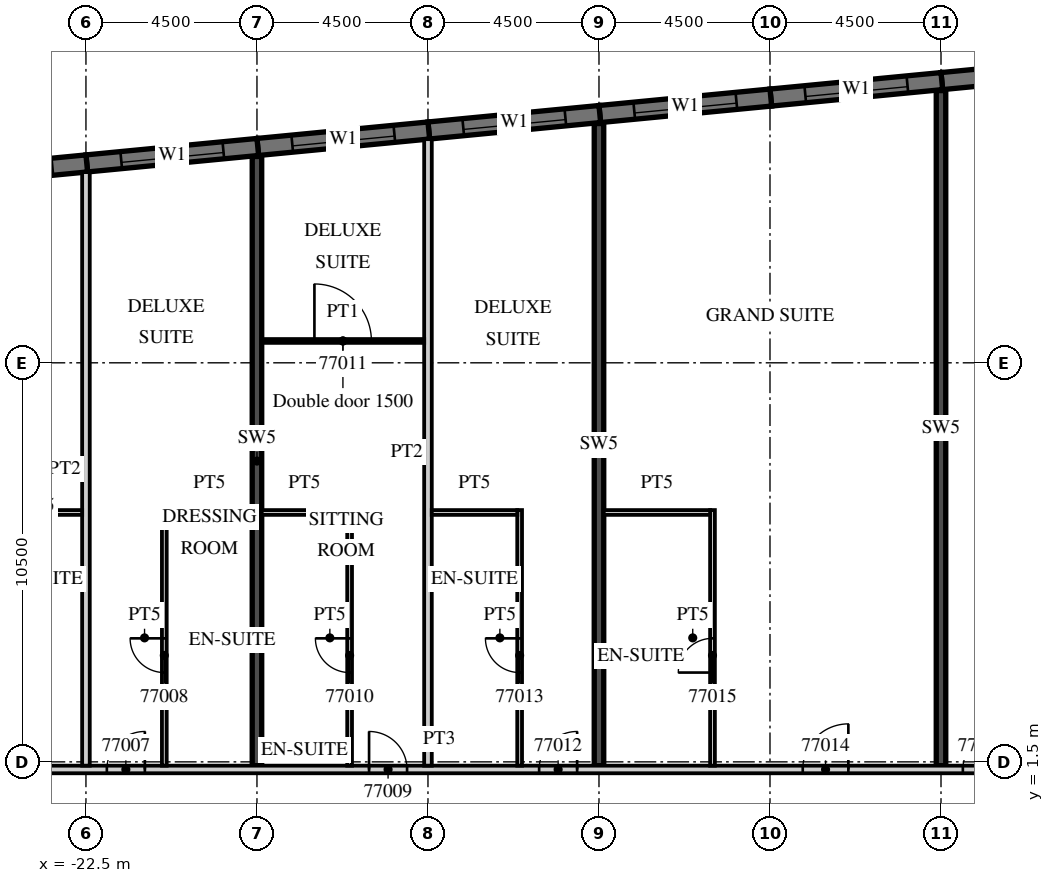
"""IFC4 building model, lengths in metres.
Left out: names, types, materials, properties, quantities, classifications, styles, units other than length and angle.
Written with IfcOpenShell. Run it as: python <this file> out.ifc"""

import sys

from ifc_helpers import new_model, si_unit, direction, frame, frame_2d, origin, place, context, subcontext, project, spatial, rectangle, extrude, element, fill, save


model = new_model("IFC4")
c1 = context("Model", 3, precision=1e-05, world=origin(), true_north=direction((0.0, 1.0)))
c2 = subcontext(c1, "Body", "Model", "MODEL_VIEW")
j1 = project(units=[si_unit("LENGTHUNIT", "METRE"), si_unit("PLANEANGLEUNIT", "RADIAN")], contexts=[c1])
p1 = place(None, origin())
s1 = spatial("IfcSite", under=j1, at=p1, CompositionType="ELEMENT")
p2 = place(p1, origin())
s2 = spatial("IfcBuilding", under=s1, at=p2, CompositionType="ELEMENT")
p3 = place(p2, frame((0.0, 0.0, 304.8)))
s3 = spatial("IfcBuildingStorey", under=s2, at=p3, CompositionType="ELEMENT", Elevation=304.8)
p4 = place(p3, frame((-18.0, 1.4, 0.0), z_axis=(0.0, 0.0, 1.0), x_axis=(0.0, 1.0, 0.0)))
e1 = element("IfcWall", 1, at=p4, inside=s3, PredefinedType="SHEAR", context=c2, shape_type="SweptSolid", body=[
    extrude(rectangle(XDim=16.03, YDim=0.25, at=frame_2d((8.015, 0.0))), origin(), (0.0, 0.0, 1.0), 3.3),
])
p5 = place(p3, frame((-9.0, 1.4, 0.0), z_axis=(0.0, 0.0, 1.0), x_axis=(0.0, 1.0, 0.0)))
e2 = element("IfcWall", 2, at=p5, inside=s3, PredefinedType="SHEAR", context=c2, shape_type="SweptSolid", body=[
    extrude(rectangle(XDim=16.896, YDim=0.25, at=frame_2d((8.448, 0.0))), origin(), (0.0, 0.0, 1.0), 3.3),
])
p6 = place(p3, frame((0.0, 1.4, 0.0), z_axis=(0.0, 0.0, 1.0), x_axis=(0.0, 1.0, 0.0)))
e3 = element("IfcWall", 3, at=p6, inside=s3, PredefinedType="SHEAR", context=c2, shape_type="SweptSolid", body=[
    extrude(rectangle(XDim=17.763, YDim=0.25, at=frame_2d((8.881, 0.0))), origin(), (0.0, 0.0, 1.0), 3.3),
])
p7 = place(p3, frame((4.521, 19.846, 0.0), z_axis=(0.0, 0.0, 1.0), x_axis=(-0.995394670263, -0.095861621166, 0.0)))
e4 = element("IfcWall", 4, at=p7, inside=s3, PredefinedType="SOLIDWALL", context=c2, shape_type="SweptSolid", body=[
    extrude(rectangle(XDim=4.521, YDim=0.45, at=frame_2d((2.26, 0.0))), origin(), (0.0, 0.0, 1.0), 2.9),
])
p8 = place(p7, frame((0.91, 0.0, 0.45)))
e5 = element("IfcOpeningElement", 5, at=p8, cuts=e4, PredefinedType="OPENING", context=c2, shape_type="SweptSolid", body=[
    extrude(rectangle(XDim=2.7, YDim=2.25, at=frame_2d((1.35, 1.125))), frame((0.0, 0.235, 0.0), z_axis=(0.0, -1.0, 0.0), x_axis=(1.0, 0.0, 0.0)), (0.0, 0.0, 1.0), 0.47),
])
p9 = place(p3, frame((0.022, 19.413, 0.0), z_axis=(0.0, 0.0, 1.0), x_axis=(-0.995400317863, -0.09580296028, 0.0)))
e6 = element("IfcWall", 6, at=p9, inside=s3, PredefinedType="SOLIDWALL", context=c2, shape_type="SweptSolid", body=[
    extrude(rectangle(XDim=4.521, YDim=0.45, at=frame_2d((2.26, 0.0))), origin(), (0.0, 0.0, 1.0), 2.9),
])
p10 = place(p9, frame((0.91, 0.0, 0.45)))
e7 = element("IfcOpeningElement", 7, at=p10, cuts=e6, PredefinedType="OPENING", context=c2, shape_type="SweptSolid", body=[
    extrude(rectangle(XDim=2.7, YDim=2.25, at=frame_2d((1.35, 1.125))), frame((0.0, 0.235, 0.0), z_axis=(0.0, -1.0, 0.0), x_axis=(1.0, 0.0, 0.0)), (0.0, 0.0, 1.0), 0.47),
])
p11 = place(p3, frame((-4.478, 18.98, 0.0), z_axis=(0.0, 0.0, 1.0), x_axis=(-0.995395662684, -0.095851315644, 0.0)))
e8 = element("IfcWall", 8, at=p11, inside=s3, PredefinedType="SOLIDWALL", context=c2, shape_type="SweptSolid", body=[
    extrude(rectangle(XDim=4.521, YDim=0.45, at=frame_2d((2.26, 0.0))), origin(), (0.0, 0.0, 1.0), 2.9),
])
p12 = place(p11, frame((0.91, 0.0, 0.45)))
e9 = element("IfcOpeningElement", 9, at=p12, cuts=e8, PredefinedType="OPENING", context=c2, shape_type="SweptSolid", body=[
    extrude(rectangle(XDim=2.7, YDim=2.25, at=frame_2d((1.35, 1.125))), frame((0.0, 0.235, 0.0), z_axis=(0.0, -1.0, 0.0), x_axis=(1.0, 0.0, 0.0)), (0.0, 0.0, 1.0), 0.47),
])
p13 = place(p3, frame((-8.979, 18.546, 0.0), z_axis=(0.0, 0.0, 1.0), x_axis=(-0.995395166513, -0.095856468129, 0.0)))
e10 = element("IfcWall", 10, at=p13, inside=s3, PredefinedType="SOLIDWALL", context=c2, shape_type="SweptSolid", body=[
    extrude(rectangle(XDim=4.521, YDim=0.45, at=frame_2d((2.26, 0.0))), origin(), (0.0, 0.0, 1.0), 2.9),
])
p14 = place(p13, frame((0.91, 0.0, 0.45)))
e11 = element("IfcOpeningElement", 11, at=p14, cuts=e10, PredefinedType="OPENING", context=c2, shape_type="SweptSolid", body=[
    extrude(rectangle(XDim=2.7, YDim=2.25, at=frame_2d((1.35, 1.125))), frame((0.0, 0.235, 0.0), z_axis=(0.0, -1.0, 0.0), x_axis=(1.0, 0.0, 0.0)), (0.0, 0.0, 1.0), 0.47),
])
p15 = place(p3, frame((-13.479, 18.113, 0.0), z_axis=(0.0, 0.0, 1.0), x_axis=(-0.995395166513, -0.095856468129, 0.0)))
e12 = element("IfcWall", 12, at=p15, inside=s3, PredefinedType="SOLIDWALL", context=c2, shape_type="SweptSolid", body=[
    extrude(rectangle(XDim=4.521, YDim=0.45, at=frame_2d((2.26, 0.0))), origin(), (0.0, 0.0, 1.0), 2.9),
])
p16 = place(p15, frame((0.91, 0.0, 0.45)))
e13 = element("IfcOpeningElement", 13, at=p16, cuts=e12, PredefinedType="OPENING", context=c2, shape_type="SweptSolid", body=[
    extrude(rectangle(XDim=2.7, YDim=2.25, at=frame_2d((1.35, 1.125))), frame((0.0, 0.235, 0.0), z_axis=(0.0, -1.0, 0.0), x_axis=(1.0, 0.0, 0.0)), (0.0, 0.0, 1.0), 0.47),
])
p17 = place(p3, frame((-17.979, 17.68, 0.0), z_axis=(0.0, 0.0, 1.0), x_axis=(-0.995395166513, -0.095856468129, 0.0)))
e14 = element("IfcWall", 14, at=p17, inside=s3, PredefinedType="SOLIDWALL", context=c2, shape_type="SweptSolid", body=[
    extrude(rectangle(XDim=4.521, YDim=0.45, at=frame_2d((2.26, 0.0))), origin(), (0.0, 0.0, 1.0), 2.9),
])
p18 = place(p17, frame((0.91, 0.0, 0.45)))
e15 = element("IfcOpeningElement", 15, at=p18, cuts=e14, PredefinedType="OPENING", context=c2, shape_type="SweptSolid", body=[
    extrude(rectangle(XDim=2.7, YDim=2.25, at=frame_2d((1.35, 1.125))), frame((0.0, 0.235, 0.0), z_axis=(0.0, -1.0, 0.0), x_axis=(1.0, 0.0, 0.0)), (0.0, 0.0, 1.0), 0.47),
])
p19 = place(p3, frame((-22.479, 17.246, 0.0), z_axis=(0.0, 0.0, 1.0), x_axis=(-0.995400317863, -0.09580296028, 0.0)))
e16 = element("IfcWall", 16, at=p19, inside=s3, PredefinedType="SOLIDWALL", context=c2, shape_type="SweptSolid", body=[
    extrude(rectangle(XDim=4.521, YDim=0.45, at=frame_2d((2.26, 0.0))), origin(), (0.0, 0.0, 1.0), 2.9),
])
p20 = place(p19, frame((0.91, 0.0, 0.45)))
e17 = element("IfcOpeningElement", 17, at=p20, cuts=e16, PredefinedType="OPENING", context=c2, shape_type="SweptSolid", body=[
    extrude(rectangle(XDim=2.7, YDim=2.25, at=frame_2d((1.35, 1.125))), frame((0.0, 0.235, 0.0), z_axis=(0.0, -1.0, 0.0), x_axis=(1.0, 0.0, 0.0)), (0.0, 0.0, 1.0), 0.47),
])
p21 = place(p3, frame((-39.909, 1.3, 0.0), z_axis=(0.0, 0.0, 1.0), x_axis=(1.0, 0.0, 0.0)))
e18 = element("IfcWall", 18, at=p21, inside=s3, PredefinedType="PARTITIONING", context=c2, shape_type="SweptSolid", body=[
    extrude(rectangle(XDim=53.409, YDim=0.2, at=frame_2d((26.705, 0.0))), origin(), (0.0, 0.0, 1.0), 2.9),
])
p22 = place(p21, frame((0.15, 0.0, 0.0)))
e19 = element("IfcOpeningElement", 19, at=p22, cuts=e18, PredefinedType="OPENING", context=c2, shape_type="SweptSolid", body=[
    extrude(rectangle(XDim=0.9, YDim=2.1, at=frame_2d((0.45, 1.05))), frame((0.0, 0.11, 0.0), z_axis=(0.0, -1.0, 0.0), x_axis=(1.0, 0.0, 0.0)), (0.0, 0.0, 1.0), 0.22),
])
p23 = place(p21, frame((9.271, 0.0, 0.0)))
e20 = element("IfcOpeningElement", 20, at=p23, cuts=e18, PredefinedType="OPENING", context=c2, shape_type="SweptSolid", body=[
    extrude(rectangle(XDim=1.2, YDim=2.1, at=frame_2d((0.6, 1.05))), frame((0.0, 0.11, 0.0), z_axis=(0.0, -1.0, 0.0), x_axis=(1.0, 0.0, 0.0)), (0.0, 0.0, 1.0), 0.22),
])
p24 = place(p21, frame((13.484, 0.0, 0.0)))
e21 = element("IfcOpeningElement", 21, at=p24, cuts=e18, PredefinedType="OPENING", context=c2, shape_type="SweptSolid", body=[
    extrude(rectangle(XDim=1.0, YDim=2.1, at=frame_2d((0.5, 1.05))), frame((0.0, 0.11, 0.0), z_axis=(0.0, -1.0, 0.0), x_axis=(1.0, 0.0, 0.0)), (0.0, 0.0, 1.0), 0.22),
])
p25 = place(p21, frame((17.959, 0.0, 0.0)))
e22 = element("IfcOpeningElement", 22, at=p25, cuts=e18, PredefinedType="OPENING", context=c2, shape_type="SweptSolid", body=[
    extrude(rectangle(XDim=1.0, YDim=2.1, at=frame_2d((0.5, 1.05))), frame((0.0, 0.11, 0.0), z_axis=(0.0, -1.0, 0.0), x_axis=(1.0, 0.0, 0.0)), (0.0, 0.0, 1.0), 0.22),
])
p26 = place(p21, frame((24.859, 0.0, 0.0)))
e23 = element("IfcOpeningElement", 23, at=p26, cuts=e18, PredefinedType="OPENING", context=c2, shape_type="SweptSolid", body=[
    extrude(rectangle(XDim=1.0, YDim=2.1, at=frame_2d((0.5, 1.05))), frame((0.0, 0.11, 0.0), z_axis=(0.0, -1.0, 0.0), x_axis=(1.0, 0.0, 0.0)), (0.0, 0.0, 1.0), 0.22),
])
p27 = place(p21, frame((29.334, 0.0, 0.0)))
e24 = element("IfcOpeningElement", 24, at=p27, cuts=e18, PredefinedType="OPENING", context=c2, shape_type="SweptSolid", body=[
    extrude(rectangle(XDim=1.0, YDim=2.1, at=frame_2d((0.5, 1.05))), frame((0.0, 0.11, 0.0), z_axis=(0.0, -1.0, 0.0), x_axis=(1.0, 0.0, 0.0)), (0.0, 0.0, 1.0), 0.22),
])
p28 = place(p21, frame((36.271, 0.0, 0.0)))
e25 = element("IfcOpeningElement", 25, at=p28, cuts=e18, PredefinedType="OPENING", context=c2, shape_type="SweptSolid", body=[
    extrude(rectangle(XDim=1.2, YDim=2.1, at=frame_2d((0.6, 1.05))), frame((0.0, 0.11, 0.0), z_axis=(0.0, -1.0, 0.0), x_axis=(1.0, 0.0, 0.0)), (0.0, 0.0, 1.0), 0.22),
])
p29 = place(p21, frame((40.484, 0.0, 0.0)))
e26 = element("IfcOpeningElement", 26, at=p29, cuts=e18, PredefinedType="OPENING", context=c2, shape_type="SweptSolid", body=[
    extrude(rectangle(XDim=1.0, YDim=2.1, at=frame_2d((0.5, 1.05))), frame((0.0, 0.11, 0.0), z_axis=(0.0, -1.0, 0.0), x_axis=(1.0, 0.0, 0.0)), (0.0, 0.0, 1.0), 0.22),
])
p30 = place(p21, frame((47.334, 0.0, 0.0)))
e27 = element("IfcOpeningElement", 27, at=p30, cuts=e18, PredefinedType="OPENING", context=c2, shape_type="SweptSolid", body=[
    extrude(rectangle(XDim=1.0, YDim=2.1, at=frame_2d((0.5, 1.05))), frame((0.0, 0.11, 0.0), z_axis=(0.0, -1.0, 0.0), x_axis=(1.0, 0.0, 0.0)), (0.0, 0.0, 1.0), 0.22),
])
p31 = place(p21, frame((51.834, 0.0, 0.0)))
e28 = element("IfcOpeningElement", 28, at=p31, cuts=e18, PredefinedType="OPENING", context=c2, shape_type="SweptSolid", body=[
    extrude(rectangle(XDim=1.0, YDim=2.1, at=frame_2d((0.5, 1.05))), frame((0.0, 0.11, 0.0), z_axis=(0.0, -1.0, 0.0), x_axis=(1.0, 0.0, 0.0)), (0.0, 0.0, 1.0), 0.22),
])
p32 = place(p3, frame((-22.5, 1.4, 0.0), z_axis=(0.0, 0.0, 1.0), x_axis=(0.0, 1.0, 0.0)))
e29 = element("IfcWall", 29, at=p32, inside=s3, PredefinedType="PARTITIONING", context=c2, shape_type="SweptSolid", body=[
    extrude(rectangle(XDim=15.618, YDim=0.2, at=frame_2d((7.809, 0.0))), origin(), (0.0, 0.0, 1.0), 2.9),
])
p33 = place(p3, frame((-24.85, 8.062, 0.0), z_axis=(0.0, 0.0, 1.0), x_axis=(1.0, 0.0, 0.0)))
e30 = element("IfcWall", 30, at=p33, inside=s3, PredefinedType="PARTITIONING", context=c2, shape_type="SweptSolid", body=[
    extrude(rectangle(XDim=2.25, YDim=0.125, at=frame_2d((1.125, 0.0))), origin(), (0.0, 0.0, 1.0), 2.9),
])
p34 = place(p3, frame((-20.438, 1.4, 0.0), z_axis=(0.0, 0.0, 1.0), x_axis=(0.0, 1.0, 0.0)))
e31 = element("IfcWall", 31, at=p34, inside=s3, PredefinedType="PARTITIONING", context=c2, shape_type="SweptSolid", body=[
    extrude(rectangle(XDim=6.725, YDim=0.125, at=frame_2d((3.363, 0.0))), origin(), (0.0, 0.0, 1.0), 2.9),
])
p35 = place(p34, frame((2.45, 0.0, 0.0)))
e32 = element("IfcOpeningElement", 32, at=p35, cuts=e31, PredefinedType="OPENING", context=c2, shape_type="SweptSolid", body=[
    extrude(rectangle(XDim=0.9, YDim=2.1, at=frame_2d((0.45, 1.05))), frame((0.0, 0.073, 0.0), z_axis=(0.0, -1.0, 0.0), x_axis=(1.0, 0.0, 0.0)), (0.0, 0.0, 1.0), 0.145),
])
p36 = place(p3, frame((-20.375, 8.062, 0.0), z_axis=(0.0, 0.0, 1.0), x_axis=(1.0, 0.0, 0.0)))
e33 = element("IfcWall", 33, at=p36, inside=s3, PredefinedType="PARTITIONING", context=c2, shape_type="SweptSolid", body=[
    extrude(rectangle(XDim=2.25, YDim=0.125, at=frame_2d((1.125, 0.0))), origin(), (0.0, 0.0, 1.0), 2.9),
])
p37 = place(p3, frame((-13.5, 1.4, 0.0), z_axis=(0.0, 0.0, 1.0), x_axis=(0.0, 1.0, 0.0)))
e34 = element("IfcWall", 34, at=p37, inside=s3, PredefinedType="PARTITIONING", context=c2, shape_type="SweptSolid", body=[
    extrude(rectangle(XDim=16.485, YDim=0.2, at=frame_2d((8.243, 0.0))), origin(), (0.0, 0.0, 1.0), 2.9),
])
p38 = place(p3, frame((-15.562, 1.4, 0.0), z_axis=(0.0, 0.0, 1.0), x_axis=(0.0, 1.0, 0.0)))
e35 = element("IfcWall", 35, at=p38, inside=s3, PredefinedType="PARTITIONING", context=c2, shape_type="SweptSolid", body=[
    extrude(rectangle(XDim=6.725, YDim=0.125, at=frame_2d((3.363, 0.0))), origin(), (0.0, 0.0, 1.0), 2.9),
])
p39 = place(p38, frame((2.45, 0.0, 0.0)))
e36 = element("IfcOpeningElement", 36, at=p39, cuts=e35, PredefinedType="OPENING", context=c2, shape_type="SweptSolid", body=[
    extrude(rectangle(XDim=0.9, YDim=2.1, at=frame_2d((0.45, 1.05))), frame((0.0, 0.073, 0.0), z_axis=(0.0, -1.0, 0.0), x_axis=(1.0, 0.0, 0.0)), (0.0, 0.0, 1.0), 0.145),
])
p40 = place(p3, frame((-17.875, 8.062, 0.0), z_axis=(0.0, 0.0, 1.0), x_axis=(1.0, 0.0, 0.0)))
e37 = element("IfcWall", 37, at=p40, inside=s3, PredefinedType="PARTITIONING", context=c2, shape_type="SweptSolid", body=[
    extrude(rectangle(XDim=2.25, YDim=0.125, at=frame_2d((1.125, 0.0))), origin(), (0.0, 0.0, 1.0), 2.9),
])
p41 = place(p3, frame((-17.875, 12.575, 0.0), z_axis=(0.0, 0.0, 1.0), x_axis=(1.0, 0.0, 0.0)))
e38 = element("IfcWall", 38, at=p41, inside=s3, PredefinedType="PARTITIONING", context=c2, shape_type="SweptSolid", body=[
    extrude(rectangle(XDim=4.275, YDim=0.1, at=frame_2d((2.137, 0.0))), origin(), (0.0, 0.0, 1.0), 2.9),
])
p42 = place(p41, frame((1.387, 0.0, 0.0)))
e39 = element("IfcOpeningElement", 39, at=p42, cuts=e38, PredefinedType="OPENING", context=c2, shape_type="SweptSolid", body=[
    extrude(rectangle(XDim=1.5, YDim=2.1, at=frame_2d((0.75, 1.05))), frame((0.0, 0.06, 0.0), z_axis=(0.0, -1.0, 0.0), x_axis=(1.0, 0.0, 0.0)), (0.0, 0.0, 1.0), 0.12),
])
p43 = place(p3, frame((-11.088, 1.4, 0.0), z_axis=(0.0, 0.0, 1.0), x_axis=(0.0, 1.0, 0.0)))
e40 = element("IfcWall", 40, at=p43, inside=s3, PredefinedType="PARTITIONING", context=c2, shape_type="SweptSolid", body=[
    extrude(rectangle(XDim=6.725, YDim=0.125, at=frame_2d((3.363, 0.0))), origin(), (0.0, 0.0, 1.0), 2.9),
])
p44 = place(p43, frame((2.45, 0.0, 0.0)))
e41 = element("IfcOpeningElement", 41, at=p44, cuts=e40, PredefinedType="OPENING", context=c2, shape_type="SweptSolid", body=[
    extrude(rectangle(XDim=0.9, YDim=2.1, at=frame_2d((0.45, 1.05))), frame((0.0, 0.073, 0.0), z_axis=(0.0, -1.0, 0.0), x_axis=(1.0, 0.0, 0.0)), (0.0, 0.0, 1.0), 0.145),
])
p45 = place(p3, frame((-13.4, 8.062, 0.0), z_axis=(0.0, 0.0, 1.0), x_axis=(1.0, 0.0, 0.0)))
e42 = element("IfcWall", 42, at=p45, inside=s3, PredefinedType="PARTITIONING", context=c2, shape_type="SweptSolid", body=[
    extrude(rectangle(XDim=2.25, YDim=0.125, at=frame_2d((1.125, 0.0))), origin(), (0.0, 0.0, 1.0), 2.9),
])
p46 = place(p3, frame((-6.013, 1.4, 0.0), z_axis=(0.0, 0.0, 1.0), x_axis=(0.0, 1.0, 0.0)))
e43 = element("IfcWall", 43, at=p46, inside=s3, PredefinedType="PARTITIONING", context=c2, shape_type="SweptSolid", body=[
    extrude(rectangle(XDim=6.725, YDim=0.125, at=frame_2d((3.363, 0.0))), origin(), (0.0, 0.0, 1.0), 2.9),
])
p47 = place(p46, frame((2.45, 0.0, 0.0)))
e44 = element("IfcOpeningElement", 44, at=p47, cuts=e43, PredefinedType="OPENING", context=c2, shape_type="SweptSolid", body=[
    extrude(rectangle(XDim=0.9, YDim=2.1, at=frame_2d((0.45, 1.05))), frame((0.0, 0.073, 0.0), z_axis=(0.0, -1.0, 0.0), x_axis=(1.0, 0.0, 0.0)), (0.0, 0.0, 1.0), 0.145),
])
p48 = place(p3, frame((-8.875, 8.062, 0.0), z_axis=(0.0, 0.0, 1.0), x_axis=(1.0, 0.0, 0.0)))
e45 = element("IfcWall", 45, at=p48, inside=s3, PredefinedType="PARTITIONING", context=c2, shape_type="SweptSolid", body=[
    extrude(rectangle(XDim=2.8, YDim=0.125, at=frame_2d((1.4, 0.0))), origin(), (0.0, 0.0, 1.0), 2.9),
])
p49 = place(p10, origin())
e46 = element("IfcWindow", 46, at=p49, inside=s3, PartitioningType="SINGLE_PANEL", PredefinedType="WINDOW", context=c2, shape_type="SweptSolid", body=[
    extrude(rectangle(XDim=2.7, YDim=2.25, at=frame_2d((1.35, 1.125))), frame((0.0, 0.09, 0.0), z_axis=(0.0, -1.0, 0.0), x_axis=(1.0, 0.0, 0.0)), (0.0, 0.0, 1.0), 0.06),
])
fill(e7, e46)
p50 = place(p12, origin())
e47 = element("IfcWindow", 47, at=p50, inside=s3, PartitioningType="SINGLE_PANEL", PredefinedType="WINDOW", context=c2, shape_type="SweptSolid", body=[
    extrude(rectangle(XDim=2.7, YDim=2.25, at=frame_2d((1.35, 1.125))), frame((0.0, 0.09, 0.0), z_axis=(0.0, -1.0, 0.0), x_axis=(1.0, 0.0, 0.0)), (0.0, 0.0, 1.0), 0.06),
])
fill(e9, e47)
p51 = place(p14, origin())
e48 = element("IfcWindow", 48, at=p51, inside=s3, PartitioningType="SINGLE_PANEL", PredefinedType="WINDOW", context=c2, shape_type="SweptSolid", body=[
    extrude(rectangle(XDim=2.7, YDim=2.25, at=frame_2d((1.35, 1.125))), frame((0.0, 0.09, 0.0), z_axis=(0.0, -1.0, 0.0), x_axis=(1.0, 0.0, 0.0)), (0.0, 0.0, 1.0), 0.06),
])
fill(e11, e48)
p52 = place(p16, origin())
e49 = element("IfcWindow", 49, at=p52, inside=s3, PartitioningType="SINGLE_PANEL", PredefinedType="WINDOW", context=c2, shape_type="SweptSolid", body=[
    extrude(rectangle(XDim=2.7, YDim=2.25, at=frame_2d((1.35, 1.125))), frame((0.0, 0.09, 0.0), z_axis=(0.0, -1.0, 0.0), x_axis=(1.0, 0.0, 0.0)), (0.0, 0.0, 1.0), 0.06),
])
fill(e13, e49)
p53 = place(p18, origin())
e50 = element("IfcWindow", 50, at=p53, inside=s3, PartitioningType="SINGLE_PANEL", PredefinedType="WINDOW", context=c2, shape_type="SweptSolid", body=[
    extrude(rectangle(XDim=2.7, YDim=2.25, at=frame_2d((1.35, 1.125))), frame((0.0, 0.09, 0.0), z_axis=(0.0, -1.0, 0.0), x_axis=(1.0, 0.0, 0.0)), (0.0, 0.0, 1.0), 0.06),
])
fill(e15, e50)
p54 = place(p20, origin())
e51 = element("IfcWindow", 51, at=p54, inside=s3, PartitioningType="SINGLE_PANEL", PredefinedType="WINDOW", context=c2, shape_type="SweptSolid", body=[
    extrude(rectangle(XDim=2.7, YDim=2.25, at=frame_2d((1.35, 1.125))), frame((0.0, 0.09, 0.0), z_axis=(0.0, -1.0, 0.0), x_axis=(1.0, 0.0, 0.0)), (0.0, 0.0, 1.0), 0.06),
])
fill(e17, e51)
p55 = place(p25, origin())
e52 = element("IfcDoor", 52, at=p55, inside=s3, OperationType="SINGLE_SWING_RIGHT", PredefinedType="DOOR", context=c2, shape_type="SweptSolid", body=[
    extrude(rectangle(XDim=1.0, YDim=2.1, at=frame_2d((0.5, 1.05))), frame((0.0, 0.025, 0.0), z_axis=(0.0, -1.0, 0.0), x_axis=(1.0, 0.0, 0.0)), (0.0, 0.0, 1.0), 0.05),
])
fill(e22, e52)
p56 = place(p35, origin())
e53 = element("IfcDoor", 53, at=p56, inside=s3, OperationType="SINGLE_SWING_RIGHT", PredefinedType="DOOR", context=c2, shape_type="SweptSolid", body=[
    extrude(rectangle(XDim=0.9, YDim=2.1, at=frame_2d((0.45, 1.05))), frame((0.0, 0.025, 0.0), z_axis=(0.0, -1.0, 0.0), x_axis=(1.0, 0.0, 0.0)), (0.0, 0.0, 1.0), 0.05),
])
fill(e32, e53)
p57 = place(p26, origin())
e54 = element("IfcDoor", 54, at=p57, inside=s3, OperationType="SINGLE_SWING_LEFT", PredefinedType="DOOR", context=c2, shape_type="SweptSolid", body=[
    extrude(rectangle(XDim=1.0, YDim=2.1, at=frame_2d((0.5, 1.05))), frame((0.0, 0.025, 0.0), z_axis=(0.0, -1.0, 0.0), x_axis=(1.0, 0.0, 0.0)), (0.0, 0.0, 1.0), 0.05),
])
fill(e23, e54)
p58 = place(p39, origin())
e55 = element("IfcDoor", 55, at=p58, inside=s3, OperationType="SINGLE_SWING_RIGHT", PredefinedType="DOOR", context=c2, shape_type="SweptSolid", body=[
    extrude(rectangle(XDim=0.9, YDim=2.1, at=frame_2d((0.45, 1.05))), frame((0.0, 0.025, 0.0), z_axis=(0.0, -1.0, 0.0), x_axis=(1.0, 0.0, 0.0)), (0.0, 0.0, 1.0), 0.05),
])
fill(e36, e55)
p59 = place(p42, origin())
e56 = element("IfcDoor", 56, at=p59, inside=s3, OperationType="SINGLE_SWING_LEFT", PredefinedType="DOOR", context=c2, shape_type="SweptSolid", body=[
    extrude(rectangle(XDim=1.5, YDim=2.1, at=frame_2d((0.75, 1.05))), frame((0.0, 0.025, 0.0), z_axis=(0.0, -1.0, 0.0), x_axis=(1.0, 0.0, 0.0)), (0.0, 0.0, 1.0), 0.05),
])
fill(e39, e56)
p60 = place(p27, origin())
e57 = element("IfcDoor", 57, at=p60, inside=s3, OperationType="SINGLE_SWING_RIGHT", PredefinedType="DOOR", context=c2, shape_type="SweptSolid", body=[
    extrude(rectangle(XDim=1.0, YDim=2.1, at=frame_2d((0.5, 1.05))), frame((0.0, 0.025, 0.0), z_axis=(0.0, -1.0, 0.0), x_axis=(1.0, 0.0, 0.0)), (0.0, 0.0, 1.0), 0.05),
])
fill(e24, e57)
p61 = place(p44, origin())
e58 = element("IfcDoor", 58, at=p61, inside=s3, OperationType="SINGLE_SWING_RIGHT", PredefinedType="DOOR", context=c2, shape_type="SweptSolid", body=[
    extrude(rectangle(XDim=0.9, YDim=2.1, at=frame_2d((0.45, 1.05))), frame((0.0, 0.025, 0.0), z_axis=(0.0, -1.0, 0.0), x_axis=(1.0, 0.0, 0.0)), (0.0, 0.0, 1.0), 0.05),
])
fill(e41, e58)
p62 = place(p28, origin())
e59 = element("IfcDoor", 59, at=p62, inside=s3, OperationType="SINGLE_SWING_RIGHT", PredefinedType="DOOR", context=c2, shape_type="SweptSolid", body=[
    extrude(rectangle(XDim=1.2, YDim=2.1, at=frame_2d((0.6, 1.05))), frame((0.0, 0.025, 0.0), z_axis=(0.0, -1.0, 0.0), x_axis=(1.0, 0.0, 0.0)), (0.0, 0.0, 1.0), 0.05),
])
fill(e25, e59)
p63 = place(p47, origin())
e60 = element("IfcDoor", 60, at=p63, inside=s3, OperationType="SINGLE_SWING_LEFT", PredefinedType="DOOR", context=c2, shape_type="SweptSolid", body=[
    extrude(rectangle(XDim=0.9, YDim=2.1, at=frame_2d((0.45, 1.05))), frame((0.0, 0.025, 0.0), z_axis=(0.0, -1.0, 0.0), x_axis=(1.0, 0.0, 0.0)), (0.0, 0.0, 1.0), 0.05),
])
fill(e44, e60)
p64 = place(p29, origin())
e61 = element("IfcDoor", 61, at=p64, inside=s3, OperationType="SINGLE_SWING_RIGHT", PredefinedType="DOOR", context=c2, shape_type="SweptSolid", body=[
    extrude(rectangle(XDim=1.0, YDim=2.1, at=frame_2d((0.5, 1.05))), frame((0.0, 0.025, 0.0), z_axis=(0.0, -1.0, 0.0), x_axis=(1.0, 0.0, 0.0)), (0.0, 0.0, 1.0), 0.05),
])
fill(e26, e61)
save(model, sys.argv[1])
